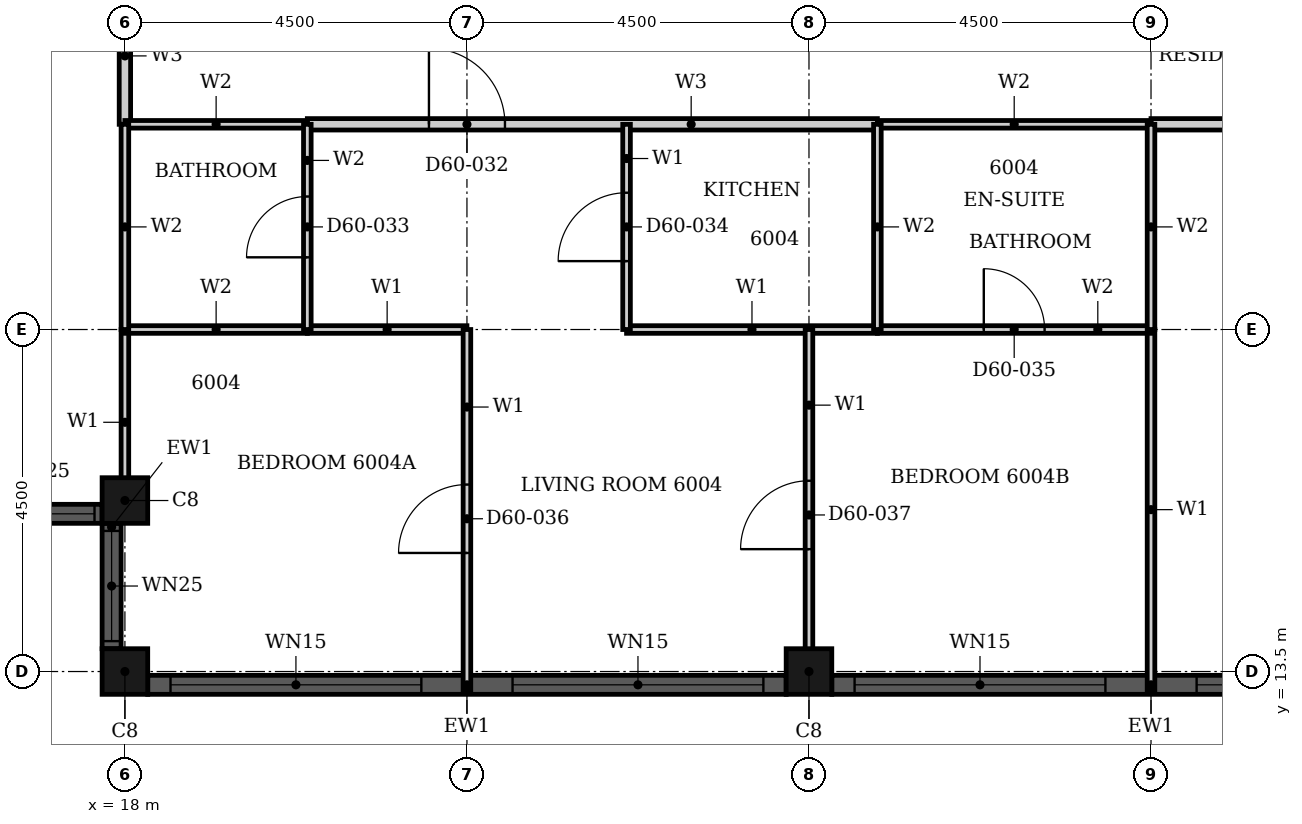
"""IFC4 building model, lengths in metres.
Left out: names, types, materials, properties, quantities, classifications, styles, units other than length and angle.
Written with IfcOpenShell. Run it as: python <this file> out.ifc"""

import sys

from ifc_helpers import new_model, si_unit, direction, frame, frame_2d, origin, origin_2d, place, context, subcontext, project, spatial, rectangle, hollow_rectangle, extrude, element, fill, save


model = new_model("IFC4")
c1 = context("Model", 3, precision=1e-05, world=origin(), true_north=direction((0.0, 1.0)))
c2 = subcontext(c1, "Body", "Model", "MODEL_VIEW")
j1 = project(units=[si_unit("LENGTHUNIT", "METRE"), si_unit("PLANEANGLEUNIT", "RADIAN")], contexts=[c1])
p1 = place(None, origin())
s1 = spatial("IfcSite", under=j1, at=p1, CompositionType="ELEMENT")
p2 = place(p1, origin())
s2 = spatial("IfcBuilding", under=s1, at=p2, CompositionType="ELEMENT")
p3 = place(p2, frame((0.0, 0.0, 237.9)))
s3 = spatial("IfcBuildingStorey", under=s2, at=p3, CompositionType="ELEMENT", Elevation=237.9)
for number, where, z_axis, x_axis in (
    (1, (18.0, 15.75, 0.0), (0.0, 0.0, 1.0), (1.0, 0.0, 0.0)),
    (2, (18.0, 13.5, 0.0), (0.0, 0.0, 1.0), (1.0, 0.0, 0.0)),
    (3, (27.0, 13.5, 0.0), (0.0, 0.0, 1.0), (1.0, 0.0, 0.0)),
):
    element("IfcColumn", number, at=place(p3, frame(where, z_axis=z_axis, x_axis=x_axis)), inside=s3, PredefinedType="COLUMN", context=c2, shape_type="SweptSolid", body=[
        extrude(hollow_rectangle(XDim=0.6, YDim=0.6, WallThickness=0.02, at=origin_2d()), origin(), (0.0, 0.0, 1.0), 3.7),
    ])
p4 = place(p3, frame((16.05, 15.575, 0.0), z_axis=(0.0, 0.0, 1.0), x_axis=(1.0, 0.0, 0.0)))
e4 = element("IfcWall", 4, at=p4, inside=s3, PredefinedType="SOLIDWALL", context=c2, shape_type="SweptSolid", body=[
    extrude(rectangle(XDim=1.65, YDim=0.25, at=frame_2d((0.825, 0.0))), origin(), (0.0, 0.0, 1.0), 3.7),
])
p5 = place(p4, frame((0.1, 0.0, 0.9)))
e5 = element("IfcOpeningElement", 5, at=p5, cuts=e4, PredefinedType="OPENING", context=c2, shape_type="SweptSolid", body=[
    extrude(rectangle(XDim=1.45, YDim=1.85, at=frame_2d((0.725, 0.925))), frame((0.0, 0.135, 0.0), z_axis=(0.0, -1.0, 0.0), x_axis=(1.0, 0.0, 0.0)), (0.0, 0.0, 1.0), 0.27),
])
p6 = place(p3, frame((17.825, 15.45, 0.0), z_axis=(0.0, 0.0, 1.0), x_axis=(0.0, -1.0, 0.0)))
e6 = element("IfcWall", 6, at=p6, inside=s3, PredefinedType="SOLIDWALL", context=c2, shape_type="SweptSolid", body=[
    extrude(rectangle(XDim=1.65, YDim=0.25, at=frame_2d((0.825, 0.0))), origin(), (0.0, 0.0, 1.0), 3.7),
])
p7 = place(p6, frame((0.1, 0.0, 0.9)))
e7 = element("IfcOpeningElement", 7, at=p7, cuts=e6, PredefinedType="OPENING", context=c2, shape_type="SweptSolid", body=[
    extrude(rectangle(XDim=1.45, YDim=1.85, at=frame_2d((0.725, 0.925))), frame((0.0, 0.135, 0.0), z_axis=(0.0, -1.0, 0.0), x_axis=(1.0, 0.0, 0.0)), (0.0, 0.0, 1.0), 0.27),
])
p8 = place(p3, frame((18.3, 13.325, 0.0), z_axis=(0.0, 0.0, 1.0), x_axis=(1.0, 0.0, 0.0)))
e8 = element("IfcWall", 8, at=p8, inside=s3, PredefinedType="SOLIDWALL", context=c2, shape_type="SweptSolid", body=[
    extrude(rectangle(XDim=8.4, YDim=0.25, at=frame_2d((4.2, 0.0))), origin(), (0.0, 0.0, 1.0), 3.7),
])
p9 = place(p8, frame((0.3, 0.0, 0.45)))
e9 = element("IfcOpeningElement", 9, at=p9, cuts=e8, PredefinedType="OPENING", context=c2, shape_type="SweptSolid", body=[
    extrude(rectangle(XDim=3.3, YDim=2.3, at=frame_2d((1.65, 1.15))), frame((0.0, 0.135, 0.0), z_axis=(0.0, -1.0, 0.0), x_axis=(1.0, 0.0, 0.0)), (0.0, 0.0, 1.0), 0.27),
])
p10 = place(p8, frame((4.8, 0.0, 0.45)))
e10 = element("IfcOpeningElement", 10, at=p10, cuts=e8, PredefinedType="OPENING", context=c2, shape_type="SweptSolid", body=[
    extrude(rectangle(XDim=3.3, YDim=2.3, at=frame_2d((1.65, 1.15))), frame((0.0, 0.135, 0.0), z_axis=(0.0, -1.0, 0.0), x_axis=(1.0, 0.0, 0.0)), (0.0, 0.0, 1.0), 0.27),
])
p11 = place(p3, frame((27.3, 13.325, 0.0), z_axis=(0.0, 0.0, 1.0), x_axis=(1.0, 0.0, 0.0)))
e11 = element("IfcWall", 11, at=p11, inside=s3, PredefinedType="SOLIDWALL", context=c2, shape_type="SweptSolid", body=[
    extrude(rectangle(XDim=8.4, YDim=0.25, at=frame_2d((4.2, 0.0))), origin(), (0.0, 0.0, 1.0), 3.7),
])
p12 = place(p11, frame((0.3, 0.0, 0.45)))
e12 = element("IfcOpeningElement", 12, at=p12, cuts=e11, PredefinedType="OPENING", context=c2, shape_type="SweptSolid", body=[
    extrude(rectangle(XDim=3.3, YDim=2.3, at=frame_2d((1.65, 1.15))), frame((0.0, 0.135, 0.0), z_axis=(0.0, -1.0, 0.0), x_axis=(1.0, 0.0, 0.0)), (0.0, 0.0, 1.0), 0.27),
])
p13 = place(p11, frame((4.8, 0.0, 0.45)))
e13 = element("IfcOpeningElement", 13, at=p13, cuts=e11, PredefinedType="OPENING", context=c2, shape_type="SweptSolid", body=[
    extrude(rectangle(XDim=3.3, YDim=2.3, at=frame_2d((1.65, 1.15))), frame((0.0, 0.135, 0.0), z_axis=(0.0, -1.0, 0.0), x_axis=(1.0, 0.0, 0.0)), (0.0, 0.0, 1.0), 0.27),
])
p14 = place(p3, frame((20.4, 20.7, 0.0), z_axis=(0.0, 0.0, 1.0), x_axis=(1.0, 0.0, 0.0)))
e14 = element("IfcWall", 14, at=p14, inside=s3, PredefinedType="PARTITIONING", context=c2, shape_type="SweptSolid", body=[
    extrude(rectangle(XDim=7.5, YDim=0.15, at=frame_2d((3.75, 0.0))), origin(), (0.0, 0.0, 1.0), 3.4),
])
p15 = place(p14, frame((1.6, 0.0, 0.0)))
e15 = element("IfcOpeningElement", 15, at=p15, cuts=e14, PredefinedType="OPENING", context=c2, shape_type="SweptSolid", body=[
    extrude(rectangle(XDim=1.0, YDim=2.2, at=frame_2d((0.5, 1.1))), frame((0.0, 0.085, 0.0), z_axis=(0.0, -1.0, 0.0), x_axis=(1.0, 0.0, 0.0)), (0.0, 0.0, 1.0), 0.17),
])
p16 = place(p3, frame((31.5, 20.7, 0.0), z_axis=(0.0, 0.0, 1.0), x_axis=(1.0, 0.0, 0.0)))
e16 = element("IfcWall", 16, at=p16, inside=s3, PredefinedType="PARTITIONING", context=c2, shape_type="SweptSolid", body=[
    extrude(rectangle(XDim=18.05, YDim=0.15, at=frame_2d((9.025, 0.0))), origin(), (0.0, 0.0, 1.0), 3.4),
])
p17 = place(p16, frame((6.25, 0.0, 0.0)))
e17 = element("IfcOpeningElement", 17, at=p17, cuts=e16, PredefinedType="OPENING", context=c2, shape_type="SweptSolid", body=[
    extrude(rectangle(XDim=1.0, YDim=2.1, at=frame_2d((0.5, 1.05))), frame((0.0, 0.085, 0.0), z_axis=(0.0, -1.0, 0.0), x_axis=(1.0, 0.0, 0.0)), (0.0, 0.0, 1.0), 0.17),
])
p18 = place(p3, frame((18.0, 20.7, 0.0), z_axis=(0.0, 0.0, 1.0), x_axis=(0.0, 1.0, 0.0)))
e18 = element("IfcWall", 18, at=p18, inside=s3, PredefinedType="PARTITIONING", context=c2, shape_type="SweptSolid", body=[
    extrude(rectangle(XDim=1.8, YDim=0.15, at=frame_2d((0.9, 0.0))), origin(), (0.0, 0.0, 1.0), 3.4),
])
p19 = place(p3, frame((20.4, 18.0, 0.0), z_axis=(0.0, 0.0, 1.0), x_axis=(1.0, 0.0, 0.0)))
e19 = element("IfcWall", 19, at=p19, inside=s3, PredefinedType="PARTITIONING", context=c2, shape_type="SweptSolid", body=[
    extrude(rectangle(XDim=2.1, YDim=0.1, at=frame_2d((1.05, 0.0))), origin(), (0.0, 0.0, 1.0), 3.4),
])
p20 = place(p3, frame((24.6, 18.0, 0.0), z_axis=(0.0, 0.0, 1.0), x_axis=(1.0, 0.0, 0.0)))
e20 = element("IfcWall", 20, at=p20, inside=s3, PredefinedType="PARTITIONING", context=c2, shape_type="SweptSolid", body=[
    extrude(rectangle(XDim=3.3, YDim=0.1, at=frame_2d((1.65, 0.0))), origin(), (0.0, 0.0, 1.0), 3.4),
])
p21 = place(p3, frame((18.0, 15.56, 0.0), z_axis=(0.0, 0.0, 1.0), x_axis=(0.0, 1.0, 0.0)))
e21 = element("IfcWall", 21, at=p21, inside=s3, PredefinedType="PARTITIONING", context=c2, shape_type="SweptSolid", body=[
    extrude(rectangle(XDim=2.439, YDim=0.1, at=frame_2d((1.219, 0.0))), origin(), (0.0, 0.0, 1.0), 3.4),
])
p22 = place(p3, frame((22.5, 13.26, 0.0), z_axis=(0.0, 0.0, 1.0), x_axis=(0.0, 1.0, 0.0)))
e22 = element("IfcWall", 22, at=p22, inside=s3, PredefinedType="PARTITIONING", context=c2, shape_type="SweptSolid", body=[
    extrude(rectangle(XDim=4.74, YDim=0.1, at=frame_2d((2.37, 0.0))), origin(), (0.0, 0.0, 1.0), 3.4),
])
p23 = place(p22, frame((1.8, 0.0, 0.0)))
e23 = element("IfcOpeningElement", 23, at=p23, cuts=e22, PredefinedType="OPENING", context=c2, shape_type="SweptSolid", body=[
    extrude(rectangle(XDim=0.9, YDim=2.1, at=frame_2d((0.45, 1.05))), frame((0.0, 0.06, 0.0), z_axis=(0.0, -1.0, 0.0), x_axis=(1.0, 0.0, 0.0)), (0.0, 0.0, 1.0), 0.12),
])
p24 = place(p3, frame((24.6, 18.0, 0.0), z_axis=(0.0, 0.0, 1.0), x_axis=(0.0, 1.0, 0.0)))
e24 = element("IfcWall", 24, at=p24, inside=s3, PredefinedType="PARTITIONING", context=c2, shape_type="SweptSolid", body=[
    extrude(rectangle(XDim=2.7, YDim=0.1, at=frame_2d((1.35, 0.0))), origin(), (0.0, 0.0, 1.0), 3.4),
])
p25 = place(p24, frame((0.9, 0.0, 0.0)))
e25 = element("IfcOpeningElement", 25, at=p25, cuts=e24, PredefinedType="OPENING", context=c2, shape_type="SweptSolid", body=[
    extrude(rectangle(XDim=0.9, YDim=2.1, at=frame_2d((0.45, 1.05))), frame((0.0, 0.06, 0.0), z_axis=(0.0, -1.0, 0.0), x_axis=(1.0, 0.0, 0.0)), (0.0, 0.0, 1.0), 0.12),
])
p26 = place(p3, frame((27.0, 13.31, 0.0), z_axis=(0.0, 0.0, 1.0), x_axis=(0.0, 1.0, 0.0)))
e26 = element("IfcWall", 26, at=p26, inside=s3, PredefinedType="PARTITIONING", context=c2, shape_type="SweptSolid", body=[
    extrude(rectangle(XDim=4.69, YDim=0.1, at=frame_2d((2.345, 0.0))), origin(), (0.0, 0.0, 1.0), 3.4),
])
p27 = place(p26, frame((1.8, 0.0, 0.0)))
e27 = element("IfcOpeningElement", 27, at=p27, cuts=e26, PredefinedType="OPENING", context=c2, shape_type="SweptSolid", body=[
    extrude(rectangle(XDim=0.9, YDim=2.1, at=frame_2d((0.45, 1.05))), frame((0.0, 0.06, 0.0), z_axis=(0.0, -1.0, 0.0), x_axis=(1.0, 0.0, 0.0)), (0.0, 0.0, 1.0), 0.12),
])
p28 = place(p3, frame((31.5, 13.26, 0.0), z_axis=(0.0, 0.0, 1.0), x_axis=(0.0, 1.0, 0.0)))
e28 = element("IfcWall", 28, at=p28, inside=s3, PredefinedType="PARTITIONING", context=c2, shape_type="SweptSolid", body=[
    extrude(rectangle(XDim=4.74, YDim=0.1, at=frame_2d((2.37, 0.0))), origin(), (0.0, 0.0, 1.0), 3.4),
])
p29 = place(p3, frame((18.0, 18.0, 0.0), z_axis=(0.0, 0.0, 1.0), x_axis=(1.0, 0.0, 0.0)))
e29 = element("IfcWall", 29, at=p29, inside=s3, PredefinedType="PARTITIONING", context=c2, shape_type="SweptSolid", body=[
    extrude(rectangle(XDim=2.4, YDim=0.1, at=frame_2d((1.2, 0.0))), origin(), (0.0, 0.0, 1.0), 3.4),
])
p30 = place(p3, frame((27.9, 18.0, 0.0), z_axis=(0.0, 0.0, 1.0), x_axis=(1.0, 0.0, 0.0)))
e30 = element("IfcWall", 30, at=p30, inside=s3, PredefinedType="PARTITIONING", context=c2, shape_type="SweptSolid", body=[
    extrude(rectangle(XDim=3.6, YDim=0.1, at=frame_2d((1.8, 0.0))), origin(), (0.0, 0.0, 1.0), 3.4),
])
p31 = place(p30, frame((1.4, 0.0, 0.0)))
e31 = element("IfcOpeningElement", 31, at=p31, cuts=e30, PredefinedType="OPENING", context=c2, shape_type="SweptSolid", body=[
    extrude(rectangle(XDim=0.8, YDim=2.1, at=frame_2d((0.4, 1.05))), frame((0.0, 0.06, 0.0), z_axis=(0.0, -1.0, 0.0), x_axis=(1.0, 0.0, 0.0)), (0.0, 0.0, 1.0), 0.12),
])
p32 = place(p3, frame((18.0, 20.7, 0.0), z_axis=(0.0, 0.0, 1.0), x_axis=(1.0, 0.0, 0.0)))
e32 = element("IfcWall", 32, at=p32, inside=s3, PredefinedType="PARTITIONING", context=c2, shape_type="SweptSolid", body=[
    extrude(rectangle(XDim=2.4, YDim=0.1, at=frame_2d((1.2, 0.0))), origin(), (0.0, 0.0, 1.0), 3.4),
])
p33 = place(p3, frame((27.9, 20.7, 0.0), z_axis=(0.0, 0.0, 1.0), x_axis=(1.0, 0.0, 0.0)))
e33 = element("IfcWall", 33, at=p33, inside=s3, PredefinedType="PARTITIONING", context=c2, shape_type="SweptSolid", body=[
    extrude(rectangle(XDim=3.6, YDim=0.1, at=frame_2d((1.8, 0.0))), origin(), (0.0, 0.0, 1.0), 3.4),
])
p34 = place(p3, frame((18.0, 18.0, 0.0), z_axis=(0.0, 0.0, 1.0), x_axis=(0.0, 1.0, 0.0)))
e34 = element("IfcWall", 34, at=p34, inside=s3, PredefinedType="PARTITIONING", context=c2, shape_type="SweptSolid", body=[
    extrude(rectangle(XDim=2.7, YDim=0.1, at=frame_2d((1.35, 0.0))), origin(), (0.0, 0.0, 1.0), 3.4),
])
p35 = place(p3, frame((20.4, 18.0, 0.0), z_axis=(0.0, 0.0, 1.0), x_axis=(0.0, 1.0, 0.0)))
e35 = element("IfcWall", 35, at=p35, inside=s3, PredefinedType="PARTITIONING", context=c2, shape_type="SweptSolid", body=[
    extrude(rectangle(XDim=2.7, YDim=0.1, at=frame_2d((1.35, 0.0))), origin(), (0.0, 0.0, 1.0), 3.4),
])
p36 = place(p35, frame((0.95, 0.0, 0.0)))
e36 = element("IfcOpeningElement", 36, at=p36, cuts=e35, PredefinedType="OPENING", context=c2, shape_type="SweptSolid", body=[
    extrude(rectangle(XDim=0.8, YDim=2.1, at=frame_2d((0.4, 1.05))), frame((0.0, 0.06, 0.0), z_axis=(0.0, -1.0, 0.0), x_axis=(1.0, 0.0, 0.0)), (0.0, 0.0, 1.0), 0.12),
])
for number, where, z_axis, x_axis in (
    (37, (27.9, 18.0, 0.0), (0.0, 0.0, 1.0), (0.0, 1.0, 0.0)),
    (38, (31.5, 18.0, 0.0), (0.0, 0.0, 1.0), (0.0, 1.0, 0.0)),
):
    element("IfcWall", number, at=place(p3, frame(where, z_axis=z_axis, x_axis=x_axis)), inside=s3, PredefinedType="PARTITIONING", context=c2, shape_type="SweptSolid", body=[
        extrude(rectangle(XDim=2.7, YDim=0.1, at=frame_2d((1.35, 0.0))), origin(), (0.0, 0.0, 1.0), 3.4),
    ])
p37 = place(p5, origin())
e39 = element("IfcWindow", 39, at=p37, inside=s3, PartitioningType="SINGLE_PANEL", PredefinedType="WINDOW", context=c2, shape_type="SweptSolid", body=[
    extrude(rectangle(XDim=1.45, YDim=1.85, at=frame_2d((0.725, 0.925))), frame((0.0, 0.03, 0.0), z_axis=(0.0, -1.0, 0.0), x_axis=(1.0, 0.0, 0.0)), (0.0, 0.0, 1.0), 0.06),
])
fill(e5, e39)
p38 = place(p7, origin())
e40 = element("IfcWindow", 40, at=p38, inside=s3, PartitioningType="SINGLE_PANEL", PredefinedType="WINDOW", context=c2, shape_type="SweptSolid", body=[
    extrude(rectangle(XDim=1.45, YDim=1.85, at=frame_2d((0.725, 0.925))), frame((0.0, 0.03, 0.0), z_axis=(0.0, -1.0, 0.0), x_axis=(1.0, 0.0, 0.0)), (0.0, 0.0, 1.0), 0.06),
])
fill(e7, e40)
p39 = place(p9, origin())
e41 = element("IfcWindow", 41, at=p39, inside=s3, PartitioningType="SINGLE_PANEL", PredefinedType="WINDOW", context=c2, shape_type="SweptSolid", body=[
    extrude(rectangle(XDim=3.3, YDim=2.3, at=frame_2d((1.65, 1.15))), frame((0.0, 0.03, 0.0), z_axis=(0.0, -1.0, 0.0), x_axis=(1.0, 0.0, 0.0)), (0.0, 0.0, 1.0), 0.06),
])
fill(e9, e41)
p40 = place(p10, origin())
e42 = element("IfcWindow", 42, at=p40, inside=s3, PartitioningType="SINGLE_PANEL", PredefinedType="WINDOW", context=c2, shape_type="SweptSolid", body=[
    extrude(rectangle(XDim=3.3, YDim=2.3, at=frame_2d((1.65, 1.15))), frame((0.0, 0.03, 0.0), z_axis=(0.0, -1.0, 0.0), x_axis=(1.0, 0.0, 0.0)), (0.0, 0.0, 1.0), 0.06),
])
fill(e10, e42)
p41 = place(p12, origin())
e43 = element("IfcWindow", 43, at=p41, inside=s3, PartitioningType="SINGLE_PANEL", PredefinedType="WINDOW", context=c2, shape_type="SweptSolid", body=[
    extrude(rectangle(XDim=3.3, YDim=2.3, at=frame_2d((1.65, 1.15))), frame((0.0, 0.03, 0.0), z_axis=(0.0, -1.0, 0.0), x_axis=(1.0, 0.0, 0.0)), (0.0, 0.0, 1.0), 0.06),
])
fill(e12, e43)
p42 = place(p13, origin())
e44 = element("IfcWindow", 44, at=p42, inside=s3, PartitioningType="SINGLE_PANEL", PredefinedType="WINDOW", context=c2, shape_type="SweptSolid", body=[
    extrude(rectangle(XDim=3.3, YDim=2.3, at=frame_2d((1.65, 1.15))), frame((0.0, 0.03, 0.0), z_axis=(0.0, -1.0, 0.0), x_axis=(1.0, 0.0, 0.0)), (0.0, 0.0, 1.0), 0.06),
])
fill(e13, e44)
p43 = place(p15, origin())
e45 = element("IfcDoor", 45, at=p43, inside=s3, OperationType="SINGLE_SWING_RIGHT", PredefinedType="DOOR", context=c2, shape_type="SweptSolid", body=[
    extrude(rectangle(XDim=1.0, YDim=2.2, at=frame_2d((0.5, 1.1))), frame((0.0, 0.025, 0.0), z_axis=(0.0, -1.0, 0.0), x_axis=(1.0, 0.0, 0.0)), (0.0, 0.0, 1.0), 0.05),
])
fill(e15, e45)
p44 = place(p36, origin())
e46 = element("IfcDoor", 46, at=p44, inside=s3, OperationType="SINGLE_SWING_LEFT", PredefinedType="DOOR", context=c2, shape_type="SweptSolid", body=[
    extrude(rectangle(XDim=0.8, YDim=2.1, at=frame_2d((0.4, 1.05))), frame((0.0, 0.025, 0.0), z_axis=(0.0, -1.0, 0.0), x_axis=(1.0, 0.0, 0.0)), (0.0, 0.0, 1.0), 0.05),
])
fill(e36, e46)
p45 = place(p25, origin())
e47 = element("IfcDoor", 47, at=p45, inside=s3, OperationType="SINGLE_SWING_LEFT", PredefinedType="DOOR", context=c2, shape_type="SweptSolid", body=[
    extrude(rectangle(XDim=0.9, YDim=2.1, at=frame_2d((0.45, 1.05))), frame((0.0, 0.025, 0.0), z_axis=(0.0, -1.0, 0.0), x_axis=(1.0, 0.0, 0.0)), (0.0, 0.0, 1.0), 0.05),
])
fill(e25, e47)
p46 = place(p31, origin())
e48 = element("IfcDoor", 48, at=p46, inside=s3, OperationType="SINGLE_SWING_RIGHT", PredefinedType="DOOR", context=c2, shape_type="SweptSolid", body=[
    extrude(rectangle(XDim=0.8, YDim=2.1, at=frame_2d((0.4, 1.05))), frame((0.0, 0.025, 0.0), z_axis=(0.0, -1.0, 0.0), x_axis=(1.0, 0.0, 0.0)), (0.0, 0.0, 1.0), 0.05),
])
fill(e31, e48)
p47 = place(p23, origin())
e49 = element("IfcDoor", 49, at=p47, inside=s3, OperationType="SINGLE_SWING_RIGHT", PredefinedType="DOOR", context=c2, shape_type="SweptSolid", body=[
    extrude(rectangle(XDim=0.9, YDim=2.1, at=frame_2d((0.45, 1.05))), frame((0.0, 0.025, 0.0), z_axis=(0.0, -1.0, 0.0), x_axis=(1.0, 0.0, 0.0)), (0.0, 0.0, 1.0), 0.05),
])
fill(e23, e49)
p48 = place(p27, origin())
e50 = element("IfcDoor", 50, at=p48, inside=s3, OperationType="SINGLE_SWING_LEFT", PredefinedType="DOOR", context=c2, shape_type="SweptSolid", body=[
    extrude(rectangle(XDim=0.9, YDim=2.1, at=frame_2d((0.45, 1.05))), frame((0.0, 0.025, 0.0), z_axis=(0.0, -1.0, 0.0), x_axis=(1.0, 0.0, 0.0)), (0.0, 0.0, 1.0), 0.05),
])
fill(e27, e50)
save(model, sys.argv[1])
